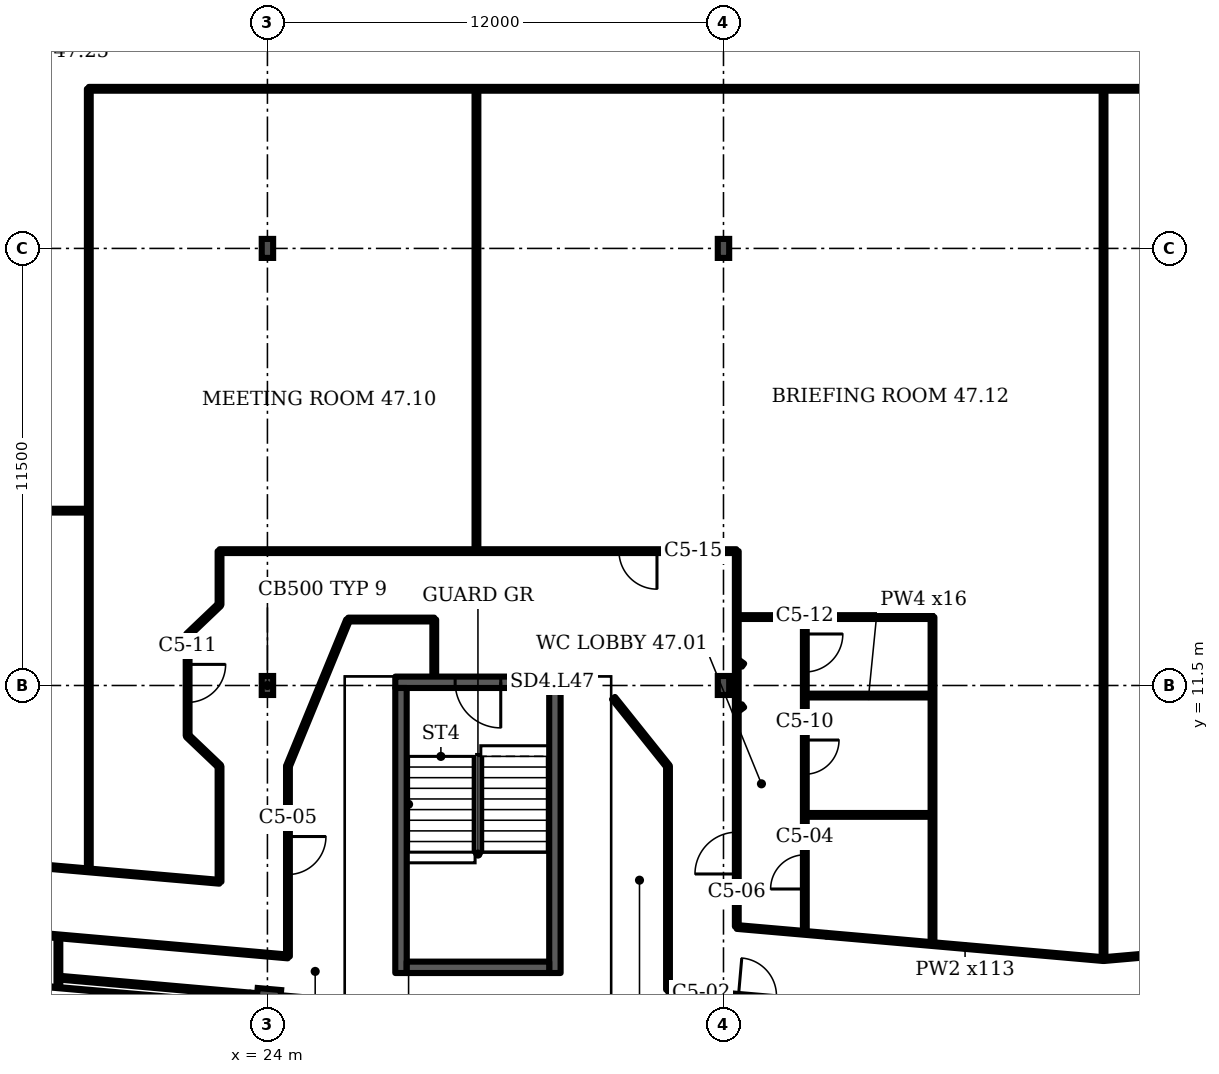
"""IFC4 building model, lengths in metres.
Left out: names, types, materials, properties, quantities, classifications, styles, units other than length and angle.
Written with IfcOpenShell. Run it as: python <this file> out.ifc"""

import sys

from ifc_helpers import new_model, si_unit, direction, frame, frame_2d, origin, origin_2d, place, context, subcontext, project, spatial, rectangle, i_section, extrude, element, fill, save


model = new_model("IFC4")
c1 = context("Model", 3, precision=1e-05, world=origin(), true_north=direction((0.0, 1.0)))
c2 = subcontext(c1, "Body", "Model", "MODEL_VIEW")
j1 = project(units=[si_unit("LENGTHUNIT", "METRE"), si_unit("PLANEANGLEUNIT", "RADIAN")], contexts=[c1])
p1 = place(None, origin())
s1 = spatial("IfcSite", under=j1, at=p1, CompositionType="ELEMENT")
p2 = place(p1, origin())
s2 = spatial("IfcBuilding", under=s1, at=p2, CompositionType="ELEMENT")
p3 = place(p2, frame((0.0, 0.0, 191.5)))
s3 = spatial("IfcBuildingStorey", under=s2, at=p3, CompositionType="ELEMENT", Elevation=191.5)
p4 = place(p3, frame((24.039, 3.361, 0.0), z_axis=(0.0, 0.0, 1.0), x_axis=(-0.087156, -0.996198, 0.0)))
e1 = element("IfcColumn", 1, at=p4, inside=s3, PredefinedType="COLUMN", context=c2, shape_type="SweptSolid", body=[
    extrude(i_section(OverallWidth=0.305, OverallDepth=0.62, WebThickness=0.021, FlangeThickness=0.04, FilletRadius=0.027, at=origin_2d()), origin(), (0.0, 0.0, 1.0), 3.6),
])
for number, where, z_axis, x_axis in (
    (2, (24.0, 11.5, 0.0), (0.0, 0.0, 1.0), (1.0, 0.0, 0.0)),
    (3, (36.0, 11.5, 0.0), (0.0, 0.0, 1.0), (1.0, 0.0, 0.0)),
    (4, (24.0, 23.0, 0.0), (0.0, 0.0, 1.0), (1.0, 0.0, 0.0)),
    (5, (36.0, 23.0, 0.0), (0.0, 0.0, 1.0), (1.0, 0.0, 0.0)),
):
    element("IfcColumn", number, at=place(p3, frame(where, z_axis=z_axis, x_axis=x_axis)), inside=s3, PredefinedType="COLUMN", context=c2, shape_type="SweptSolid", body=[
        extrude(i_section(OverallWidth=0.3, OverallDepth=0.5, WebThickness=0.014, FlangeThickness=0.028, FilletRadius=0.027, at=origin_2d()), origin(), (0.0, 0.0, 1.0), 3.6),
    ])
p5 = place(p3, frame((12.835, 3.885, 0.0), z_axis=(0.0, 0.0, 1.0), x_axis=(0.996199, -0.087154, 0.0)))
e6 = element("IfcWall", 6, at=p5, inside=s3, PredefinedType="SOLIDWALL", context=c2, shape_type="SweptSolid", body=[
    extrude(rectangle(XDim=11.177, YDim=0.35, at=frame_2d((5.588, 0.0))), origin(), (0.0, 0.0, 1.0), 1.0),
])
p6 = place(p3, frame((27.364, 11.584, 0.0), z_axis=(0.0, 0.0, 1.0), x_axis=(1.0, 0.0, 0.0)))
e7 = element("IfcWall", 7, at=p6, inside=s3, PredefinedType="SHEAR", context=c2, shape_type="SweptSolid", body=[
    extrude(rectangle(XDim=4.35, YDim=0.3, at=frame_2d((2.175, 0.0))), origin(), (0.0, 0.0, 1.0), 3.2),
])
p7 = place(p6, frame((1.575, 0.0, 0.0)))
e8 = element("IfcOpeningElement", 8, at=p7, cuts=e7, PredefinedType="OPENING", context=c2, shape_type="SweptSolid", body=[
    extrude(rectangle(XDim=1.2, YDim=2.1, at=frame_2d((0.6, 1.05))), frame((0.0, 0.16, 0.0), z_axis=(0.0, -1.0, 0.0), x_axis=(1.0, 0.0, 0.0)), (0.0, 0.0, 1.0), 0.32),
])
p8 = place(p3, frame((10.3, 16.1, 0.0), z_axis=(0.0, 0.0, 1.0), x_axis=(1.0, 0.0, 0.0)))
e9 = element("IfcWall", 9, at=p8, inside=s3, PredefinedType="PARTITIONING", context=c2, shape_type="SweptSolid", body=[
    extrude(rectangle(XDim=9.0, YDim=0.1, at=frame_2d((4.5, 0.0))), origin(), (0.0, 0.0, 1.0), 3.2),
])
p9 = place(p3, frame((18.5, 3.425, 0.0), z_axis=(0.0, 0.0, 1.0), x_axis=(0.0, 1.0, 0.0)))
e10 = element("IfcWall", 10, at=p9, inside=s3, PredefinedType="PARTITIONING", context=c2, shape_type="SweptSolid", body=[
    extrude(rectangle(XDim=1.475, YDim=0.1, at=frame_2d((0.737, 0.0))), origin(), (0.0, 0.0, 1.0), 2.58),
])
p10 = place(p3, frame((19.3, 6.705, 0.0), z_axis=(0.0, 0.0, 1.0), x_axis=(0.0, 1.0, 0.0)))
e11 = element("IfcWall", 11, at=p10, inside=s3, PredefinedType="PARTITIONING", context=c2, shape_type="SweptSolid", body=[
    extrude(rectangle(XDim=20.495, YDim=0.1, at=frame_2d((10.248, 0.0))), origin(), (0.0, 0.0, 1.0), 3.2),
])
p11 = place(p3, frame((19.3, 27.2, 0.0), z_axis=(0.0, 0.0, 1.0), x_axis=(1.0, 0.0, 0.0)))
e12 = element("IfcWall", 12, at=p11, inside=s3, PredefinedType="PARTITIONING", context=c2, shape_type="SweptSolid", body=[
    extrude(rectangle(XDim=41.305, YDim=0.1, at=frame_2d((20.652, 0.0))), origin(), (0.0, 0.0, 1.0), 3.2),
])
p12 = place(p11, frame((32.32, 0.0, 0.0)))
e13 = element("IfcOpeningElement", 13, at=p12, cuts=e12, PredefinedType="OPENING", context=c2, shape_type="SweptSolid", body=[
    extrude(rectangle(XDim=1.8, YDim=2.1, at=frame_2d((0.9, 1.05))), frame((0.0, 0.06, 0.0), z_axis=(0.0, -1.0, 0.0), x_axis=(1.0, 0.0, 0.0)), (0.0, 0.0, 1.0), 0.12),
])
p13 = place(p3, frame((21.9, 12.825, 0.0), z_axis=(0.0, 0.0, 1.0), x_axis=(0.724157, 0.689643, 0.0)))
e14 = element("IfcWall", 14, at=p13, inside=s3, PredefinedType="PARTITIONING", context=c2, shape_type="SweptSolid", body=[
    extrude(rectangle(XDim=1.16, YDim=0.1, at=frame_2d((0.58, 0.0))), origin(), (0.0, 0.0, 1.0), 3.2),
])
p14 = place(p3, frame((21.9, 10.175, 0.0), z_axis=(0.0, 0.0, 1.0), x_axis=(0.0, 1.0, 0.0)))
e15 = element("IfcWall", 15, at=p14, inside=s3, PredefinedType="PARTITIONING", context=c2, shape_type="SweptSolid", body=[
    extrude(rectangle(XDim=2.65, YDim=0.1, at=frame_2d((1.325, 0.0))), origin(), (0.0, 0.0, 1.0), 3.2),
])
p15 = place(p14, frame((0.88, 0.0, 0.0)))
e16 = element("IfcOpeningElement", 16, at=p15, cuts=e15, PredefinedType="OPENING", context=c2, shape_type="SweptSolid", body=[
    extrude(rectangle(XDim=1.0, YDim=2.1, at=frame_2d((0.5, 1.05))), frame((0.0, 0.06, 0.0), z_axis=(0.0, -1.0, 0.0), x_axis=(1.0, 0.0, 0.0)), (0.0, 0.0, 1.0), 0.12),
])
p16 = place(p3, frame((22.74, 9.375, 0.0), z_axis=(0.0, 0.0, 1.0), x_axis=(-0.724157, 0.689643, 0.0)))
e17 = element("IfcWall", 17, at=p16, inside=s3, PredefinedType="PARTITIONING", context=c2, shape_type="SweptSolid", body=[
    extrude(rectangle(XDim=1.16, YDim=0.1, at=frame_2d((0.58, 0.0))), origin(), (0.0, 0.0, 1.0), 3.2),
])
p17 = place(p3, frame((22.74, 6.335, 0.0), z_axis=(0.0, 0.0, 1.0), x_axis=(-0.996229, 0.086722, 0.0)))
e18 = element("IfcWall", 18, at=p17, inside=s3, PredefinedType="PARTITIONING", context=c2, shape_type="SweptSolid", body=[
    extrude(rectangle(XDim=6.478, YDim=0.1, at=frame_2d((3.239, 0.0))), origin(), (0.0, 0.0, 1.0), 3.2),
])
p18 = place(p3, frame((22.74, 6.335, 0.0), z_axis=(0.0, 0.0, 1.0), x_axis=(0.0, 1.0, 0.0)))
e19 = element("IfcWall", 19, at=p18, inside=s3, PredefinedType="PARTITIONING", context=c2, shape_type="SweptSolid", body=[
    extrude(rectangle(XDim=3.04, YDim=0.1, at=frame_2d((1.52, 0.0))), origin(), (0.0, 0.0, 1.0), 3.2),
])
p19 = place(p3, frame((22.74, 13.625, 0.0), z_axis=(0.0, 0.0, 1.0), x_axis=(0.0, 1.0, 0.0)))
e20 = element("IfcWall", 20, at=p19, inside=s3, PredefinedType="PARTITIONING", context=c2, shape_type="SweptSolid", body=[
    extrude(rectangle(XDim=1.41, YDim=0.1, at=frame_2d((0.705, 0.0))), origin(), (0.0, 0.0, 1.0), 3.2),
])
p20 = place(p3, frame((22.74, 15.035, 0.0), z_axis=(0.0, 0.0, 1.0), x_axis=(1.0, 0.0, 0.0)))
e21 = element("IfcWall", 21, at=p20, inside=s3, PredefinedType="PARTITIONING", context=c2, shape_type="SweptSolid", body=[
    extrude(rectangle(XDim=13.6, YDim=0.1, at=frame_2d((6.8, 0.0))), origin(), (0.0, 0.0, 1.0), 3.2),
])
p21 = place(p20, frame((10.51, 0.0, 0.0)))
e22 = element("IfcOpeningElement", 22, at=p21, cuts=e21, PredefinedType="OPENING", context=c2, shape_type="SweptSolid", body=[
    extrude(rectangle(XDim=1.0, YDim=2.1, at=frame_2d((0.5, 1.05))), frame((0.0, 0.06, 0.0), z_axis=(0.0, -1.0, 0.0), x_axis=(1.0, 0.0, 0.0)), (0.0, 0.0, 1.0), 0.12),
])
p22 = place(p3, frame((23.54, 3.37, 0.0), z_axis=(0.0, 0.0, 1.0), x_axis=(-0.996148, 0.087735, 0.0)))
e23 = element("IfcWall", 23, at=p22, inside=s3, PredefinedType="PARTITIONING", context=c2, shape_type="SweptSolid", body=[
    extrude(rectangle(XDim=5.014, YDim=0.1, at=frame_2d((2.507, 0.0))), origin(), (0.0, 0.0, 1.0), 2.58),
])
p23 = place(p3, frame((24.54, 9.375, 0.0), z_axis=(0.0, 0.0, 1.0), x_axis=(0.380187, 0.924914, 0.0)))
e24 = element("IfcWall", 24, at=p23, inside=s3, PredefinedType="PARTITIONING", context=c2, shape_type="SweptSolid", body=[
    extrude(rectangle(XDim=4.156, YDim=0.1, at=frame_2d((2.078, 0.0))), origin(), (0.0, 0.0, 1.0), 3.2),
])
p24 = place(p3, frame((24.54, 4.37, 0.0), z_axis=(0.0, 0.0, 1.0), x_axis=(0.0, 1.0, 0.0)))
e25 = element("IfcWall", 25, at=p24, inside=s3, PredefinedType="PARTITIONING", context=c2, shape_type="SweptSolid", body=[
    extrude(rectangle(XDim=5.005, YDim=0.1, at=frame_2d((2.502, 0.0))), origin(), (0.0, 0.0, 1.0), 3.2),
])
p25 = place(p24, frame((2.156, 0.0, 0.0)))
e26 = element("IfcOpeningElement", 26, at=p25, cuts=e25, PredefinedType="OPENING", context=c2, shape_type="SweptSolid", body=[
    extrude(rectangle(XDim=1.0, YDim=2.1, at=frame_2d((0.5, 1.05))), frame((0.0, 0.06, 0.0), z_axis=(0.0, -1.0, 0.0), x_axis=(1.0, 0.0, 0.0)), (0.0, 0.0, 1.0), 0.12),
])
p26 = place(p3, frame((24.54, 4.37, 0.0), z_axis=(0.0, 0.0, 1.0), x_axis=(-0.996178, 0.08739, 0.0)))
e27 = element("IfcWall", 27, at=p26, inside=s3, PredefinedType="PARTITIONING", context=c2, shape_type="SweptSolid", body=[
    extrude(rectangle(XDim=10.077, YDim=0.1, at=frame_2d((5.039, 0.0))), origin(), (0.0, 0.0, 1.0), 3.2),
])
p27 = place(p3, frame((26.019, 3.157, 0.0), z_axis=(0.0, 0.0, 1.0), x_axis=(-0.996317, 0.085749, 0.0)))
e28 = element("IfcWall", 28, at=p27, inside=s3, PredefinedType="PARTITIONING", context=c2, shape_type="SweptSolid", body=[
    extrude(rectangle(XDim=2.489, YDim=0.1, at=frame_2d((1.244, 0.0))), origin(), (0.0, 0.0, 1.0), 2.58),
])
p28 = place(p3, frame((26.125, 13.235, 0.0), z_axis=(0.0, 0.0, 1.0), x_axis=(1.0, 0.0, 0.0)))
e29 = element("IfcWall", 29, at=p28, inside=s3, PredefinedType="PARTITIONING", context=c2, shape_type="SweptSolid", body=[
    extrude(rectangle(XDim=2.265, YDim=0.1, at=frame_2d((1.132, 0.0))), origin(), (0.0, 0.0, 1.0), 3.2),
])
p29 = place(p3, frame((28.39, 11.754, 0.0), z_axis=(0.0, 0.0, 1.0), x_axis=(0.0, 1.0, 0.0)))
e30 = element("IfcWall", 30, at=p29, inside=s3, PredefinedType="PARTITIONING", context=c2, shape_type="SweptSolid", body=[
    extrude(rectangle(XDim=1.481, YDim=0.1, at=frame_2d((0.74, 0.0))), origin(), (0.0, 0.0, 1.0), 3.2),
])
p30 = place(p3, frame((29.5, 15.035, 0.0), z_axis=(0.0, 0.0, 1.0), x_axis=(0.0, 1.0, 0.0)))
e31 = element("IfcWall", 31, at=p30, inside=s3, PredefinedType="PARTITIONING", context=c2, shape_type="SweptSolid", body=[
    extrude(rectangle(XDim=12.165, YDim=0.1, at=frame_2d((6.083, 0.0))), origin(), (0.0, 0.0, 1.0), 3.2),
])
p31 = place(p3, frame((34.54, 3.495, 0.0), z_axis=(0.0, 0.0, 1.0), x_axis=(0.0, 1.0, 0.0)))
e32 = element("IfcWall", 32, at=p31, inside=s3, PredefinedType="PARTITIONING", context=c2, shape_type="SweptSolid", body=[
    extrude(rectangle(XDim=5.88, YDim=0.1, at=frame_2d((2.94, 0.0))), origin(), (0.0, 0.0, 1.0), 3.2),
])
p32 = place(p3, frame((34.54, 9.375, 0.0), z_axis=(0.0, 0.0, 1.0), x_axis=(-0.624735, 0.780839, 0.0)))
e33 = element("IfcWall", 33, at=p32, inside=s3, PredefinedType="PARTITIONING", context=c2, shape_type="SweptSolid", body=[
    extrude(rectangle(XDim=2.296, YDim=0.1, at=frame_2d((1.148, 0.0))), origin(), (0.0, 0.0, 1.0), 3.2),
])
p33 = place(p3, frame((36.35, 5.155, 0.0), z_axis=(0.0, 0.0, 1.0), x_axis=(0.0, 1.0, 0.0)))
e34 = element("IfcWall", 34, at=p33, inside=s3, PredefinedType="PARTITIONING", context=c2, shape_type="SweptSolid", body=[
    extrude(rectangle(XDim=9.88, YDim=0.1, at=frame_2d((4.94, 0.0))), origin(), (0.0, 0.0, 1.0), 3.2),
])
p34 = place(p33, frame((1.385, 0.0, 0.0)))
e35 = element("IfcOpeningElement", 35, at=p34, cuts=e34, PredefinedType="OPENING", context=c2, shape_type="SweptSolid", body=[
    extrude(rectangle(XDim=1.1, YDim=2.1, at=frame_2d((0.55, 1.05))), frame((0.0, 0.06, 0.0), z_axis=(0.0, -1.0, 0.0), x_axis=(1.0, 0.0, 0.0)), (0.0, 0.0, 1.0), 0.12),
])
p35 = place(p3, frame((36.35, 10.845, 0.0), z_axis=(0.0, 0.0, 1.0), x_axis=(0.808115, 0.589026, 0.0)))
e36 = element("IfcWall", 36, at=p35, inside=s3, PredefinedType="PARTITIONING", context=c2, shape_type="SweptSolid", body=[
    extrude(rectangle(XDim=0.204, YDim=0.1, at=frame_2d((0.102, 0.0))), origin(), (0.0, 0.0, 1.0), 3.2),
])
p36 = place(p3, frame((36.35, 13.3, 0.0), z_axis=(0.0, 0.0, 1.0), x_axis=(1.0, 0.0, 0.0)))
e37 = element("IfcWall", 37, at=p36, inside=s3, PredefinedType="PARTITIONING", context=c2, shape_type="SweptSolid", body=[
    extrude(rectangle(XDim=5.15, YDim=0.1, at=frame_2d((2.575, 0.0))), origin(), (0.0, 0.0, 1.0), 3.2),
])
p37 = place(p3, frame((36.515, 12.035, 0.0), z_axis=(0.0, 0.0, 1.0), x_axis=(-0.808115, 0.589026, 0.0)))
e38 = element("IfcWall", 38, at=p37, inside=s3, PredefinedType="PARTITIONING", context=c2, shape_type="SweptSolid", body=[
    extrude(rectangle(XDim=0.204, YDim=0.1, at=frame_2d((0.102, 0.0))), origin(), (0.0, 0.0, 1.0), 3.2),
])
p38 = place(p3, frame((38.14, 5.0, 0.0), z_axis=(0.0, 0.0, 1.0), x_axis=(0.0, 1.0, 0.0)))
e39 = element("IfcWall", 39, at=p38, inside=s3, PredefinedType="PARTITIONING", context=c2, shape_type="SweptSolid", body=[
    extrude(rectangle(XDim=8.3, YDim=0.1, at=frame_2d((4.15, 0.0))), origin(), (0.0, 0.0, 1.0), 3.2),
])
p39 = place(p38, frame((1.145, 0.0, 0.0)))
e40 = element("IfcOpeningElement", 40, at=p39, cuts=e39, PredefinedType="OPENING", context=c2, shape_type="SweptSolid", body=[
    extrude(rectangle(XDim=0.9, YDim=2.1, at=frame_2d((0.45, 1.05))), frame((0.0, 0.06, 0.0), z_axis=(0.0, -1.0, 0.0), x_axis=(1.0, 0.0, 0.0)), (0.0, 0.0, 1.0), 0.12),
])
p40 = place(p38, frame((4.165, 0.0, 0.0)))
e41 = element("IfcOpeningElement", 41, at=p40, cuts=e39, PredefinedType="OPENING", context=c2, shape_type="SweptSolid", body=[
    extrude(rectangle(XDim=0.9, YDim=2.1, at=frame_2d((0.45, 1.05))), frame((0.0, 0.06, 0.0), z_axis=(0.0, -1.0, 0.0), x_axis=(1.0, 0.0, 0.0)), (0.0, 0.0, 1.0), 0.12),
])
p41 = place(p38, frame((6.855, 0.0, 0.0)))
e42 = element("IfcOpeningElement", 42, at=p41, cuts=e39, PredefinedType="OPENING", context=c2, shape_type="SweptSolid", body=[
    extrude(rectangle(XDim=1.0, YDim=2.1, at=frame_2d((0.5, 1.05))), frame((0.0, 0.06, 0.0), z_axis=(0.0, -1.0, 0.0), x_axis=(1.0, 0.0, 0.0)), (0.0, 0.0, 1.0), 0.12),
])
for number, where, z_axis, x_axis in (
    (43, (38.14, 8.095, 0.0), (0.0, 0.0, 1.0), (1.0, 0.0, 0.0)),
    (44, (38.14, 11.235, 0.0), (0.0, 0.0, 1.0), (1.0, 0.0, 0.0)),
):
    element("IfcWall", number, at=place(p3, frame(where, z_axis=z_axis, x_axis=x_axis)), inside=s3, PredefinedType="PARTITIONING", context=c2, shape_type="SweptSolid", body=[
        extrude(rectangle(XDim=3.36, YDim=0.1, at=frame_2d((1.68, 0.0))), origin(), (0.0, 0.0, 1.0), 3.2),
    ])
p42 = place(p3, frame((38.715, 4.94, 0.0), z_axis=(0.0, 0.0, 1.0), x_axis=(-0.996236, 0.086674, 0.0)))
e45 = element("IfcWall", 45, at=p42, inside=s3, PredefinedType="PARTITIONING", context=c2, shape_type="SweptSolid", body=[
    extrude(rectangle(XDim=2.372, YDim=0.1, at=frame_2d((1.186, 0.0))), origin(), (0.0, 0.0, 1.0), 3.2),
])
p43 = place(p3, frame((41.5, 4.695, 0.0), z_axis=(0.0, 0.0, 1.0), x_axis=(0.0, 1.0, 0.0)))
e46 = element("IfcWall", 46, at=p43, inside=s3, PredefinedType="PARTITIONING", context=c2, shape_type="SweptSolid", body=[
    extrude(rectangle(XDim=8.605, YDim=0.1, at=frame_2d((4.302, 0.0))), origin(), (0.0, 0.0, 1.0), 3.2),
])
p44 = place(p3, frame((46.0, 4.3, 0.0), z_axis=(0.0, 0.0, 1.0), x_axis=(-0.996173, 0.087448, 0.0)))
e47 = element("IfcWall", 47, at=p44, inside=s3, PredefinedType="PARTITIONING", context=c2, shape_type="SweptSolid", body=[
    extrude(rectangle(XDim=7.315, YDim=0.1, at=frame_2d((3.657, 0.0))), origin(), (0.0, 0.0, 1.0), 3.2),
])
p45 = place(p3, frame((46.0, 2.495, 0.0), z_axis=(0.0, 0.0, 1.0), x_axis=(-0.996214, 0.08693, 0.0)))
e48 = element("IfcWall", 48, at=p45, inside=s3, PredefinedType="PARTITIONING", context=c2, shape_type="SweptSolid", body=[
    extrude(rectangle(XDim=11.503, YDim=0.1, at=frame_2d((5.752, 0.0))), origin(), (0.0, 0.0, 1.0), 3.2),
])
p46 = place(p45, frame((8.642, 0.0, 0.0)))
e49 = element("IfcOpeningElement", 49, at=p46, cuts=e48, PredefinedType="OPENING", context=c2, shape_type="SweptSolid", body=[
    extrude(rectangle(XDim=1.0, YDim=2.1, at=frame_2d((0.5, 1.05))), frame((0.0, 0.06, 0.0), z_axis=(0.0, -1.0, 0.0), x_axis=(1.0, 0.0, 0.0)), (0.0, 0.0, 1.0), 0.12),
])
p47 = place(p3, frame((46.0, 4.3, 0.0), z_axis=(0.0, 0.0, 1.0), x_axis=(0.0, 1.0, 0.0)))
e50 = element("IfcWall", 50, at=p47, inside=s3, PredefinedType="PARTITIONING", context=c2, shape_type="SweptSolid", body=[
    extrude(rectangle(XDim=22.9, YDim=0.1, at=frame_2d((11.45, 0.0))), origin(), (0.0, 0.0, 1.0), 3.2),
])
p48 = place(p3, frame((46.0, 4.3, 0.0), z_axis=(0.0, 0.0, 1.0), x_axis=(0.996189, 0.087194, 0.0)))
e51 = element("IfcWall", 51, at=p48, inside=s3, PredefinedType="PARTITIONING", context=c2, shape_type="SweptSolid", body=[
    extrude(rectangle(XDim=12.558, YDim=0.1, at=frame_2d((6.279, 0.0))), origin(), (0.0, 0.0, 1.0), 3.2),
])
for number, where, z_axis, x_axis in (
    (52, (27.514, 3.934, 0.0), (0.0, 0.0, 1.0), (0.0, 1.0, 0.0)),
    (53, (31.564, 3.934, 0.0), (0.0, 0.0, 1.0), (0.0, 1.0, 0.0)),
):
    element("IfcWall", number, at=place(p3, frame(where, z_axis=z_axis, x_axis=x_axis)), inside=s3, PredefinedType="SHEAR", context=c2, shape_type="SweptSolid", body=[
        extrude(rectangle(XDim=7.5, YDim=0.3, at=frame_2d((3.75, 0.0))), origin(), (0.0, 0.0, 1.0), 3.2),
    ])
p49 = place(p3, frame((27.664, 4.084, 0.0), z_axis=(0.0, 0.0, 1.0), x_axis=(1.0, 0.0, 0.0)))
e54 = element("IfcWall", 54, at=p49, inside=s3, PredefinedType="SHEAR", context=c2, shape_type="SweptSolid", body=[
    extrude(rectangle(XDim=3.75, YDim=0.3, at=frame_2d((1.875, 0.0))), origin(), (0.0, 0.0, 1.0), 3.2),
])
p50 = place(p7, origin())
e55 = element("IfcDoor", 55, at=p50, inside=s3, OperationType="SINGLE_SWING_RIGHT", PredefinedType="DOOR", context=c2, shape_type="SweptSolid", body=[
    extrude(rectangle(XDim=1.2, YDim=2.1, at=frame_2d((0.6, 1.05))), frame((0.0, 0.025, 0.0), z_axis=(0.0, -1.0, 0.0), x_axis=(1.0, 0.0, 0.0)), (0.0, 0.0, 1.0), 0.05),
])
fill(e8, e55)
p51 = place(p46, origin())
e56 = element("IfcDoor", 56, at=p51, inside=s3, OperationType="SINGLE_SWING_RIGHT", PredefinedType="DOOR", context=c2, shape_type="SweptSolid", body=[
    extrude(rectangle(XDim=1.0, YDim=2.1, at=frame_2d((0.5, 1.05))), frame((0.0, 0.025, 0.0), z_axis=(0.0, -1.0, 0.0), x_axis=(1.0, 0.0, 0.0)), (0.0, 0.0, 1.0), 0.05),
])
fill(e49, e56)
p52 = place(p39, origin())
e57 = element("IfcDoor", 57, at=p52, inside=s3, OperationType="SINGLE_SWING_LEFT", PredefinedType="DOOR", context=c2, shape_type="SweptSolid", body=[
    extrude(rectangle(XDim=0.9, YDim=2.1, at=frame_2d((0.45, 1.05))), frame((0.0, 0.025, 0.0), z_axis=(0.0, -1.0, 0.0), x_axis=(1.0, 0.0, 0.0)), (0.0, 0.0, 1.0), 0.05),
])
fill(e40, e57)
p53 = place(p25, origin())
e58 = element("IfcDoor", 58, at=p53, inside=s3, OperationType="SINGLE_SWING_RIGHT", PredefinedType="DOOR", context=c2, shape_type="SweptSolid", body=[
    extrude(rectangle(XDim=1.0, YDim=2.1, at=frame_2d((0.5, 1.05))), frame((0.0, 0.025, 0.0), z_axis=(0.0, -1.0, 0.0), x_axis=(1.0, 0.0, 0.0)), (0.0, 0.0, 1.0), 0.05),
])
fill(e26, e58)
p54 = place(p34, origin())
e59 = element("IfcDoor", 59, at=p54, inside=s3, OperationType="SINGLE_SWING_LEFT", PredefinedType="DOOR", context=c2, shape_type="SweptSolid", body=[
    extrude(rectangle(XDim=1.1, YDim=2.1, at=frame_2d((0.55, 1.05))), frame((0.0, 0.025, 0.0), z_axis=(0.0, -1.0, 0.0), x_axis=(1.0, 0.0, 0.0)), (0.0, 0.0, 1.0), 0.05),
])
fill(e35, e59)
p55 = place(p40, origin())
e60 = element("IfcDoor", 60, at=p55, inside=s3, OperationType="SINGLE_SWING_RIGHT", PredefinedType="DOOR", context=c2, shape_type="SweptSolid", body=[
    extrude(rectangle(XDim=0.9, YDim=2.1, at=frame_2d((0.45, 1.05))), frame((0.0, 0.025, 0.0), z_axis=(0.0, -1.0, 0.0), x_axis=(1.0, 0.0, 0.0)), (0.0, 0.0, 1.0), 0.05),
])
fill(e41, e60)
p56 = place(p15, origin())
e61 = element("IfcDoor", 61, at=p56, inside=s3, OperationType="SINGLE_SWING_RIGHT", PredefinedType="DOOR", context=c2, shape_type="SweptSolid", body=[
    extrude(rectangle(XDim=1.0, YDim=2.1, at=frame_2d((0.5, 1.05))), frame((0.0, 0.025, 0.0), z_axis=(0.0, -1.0, 0.0), x_axis=(1.0, 0.0, 0.0)), (0.0, 0.0, 1.0), 0.05),
])
fill(e16, e61)
p57 = place(p41, origin())
e62 = element("IfcDoor", 62, at=p57, inside=s3, OperationType="SINGLE_SWING_RIGHT", PredefinedType="DOOR", context=c2, shape_type="SweptSolid", body=[
    extrude(rectangle(XDim=1.0, YDim=2.1, at=frame_2d((0.5, 1.05))), frame((0.0, 0.025, 0.0), z_axis=(0.0, -1.0, 0.0), x_axis=(1.0, 0.0, 0.0)), (0.0, 0.0, 1.0), 0.05),
])
fill(e42, e62)
p58 = place(p21, origin())
e63 = element("IfcDoor", 63, at=p58, inside=s3, OperationType="SINGLE_SWING_RIGHT", PredefinedType="DOOR", context=c2, shape_type="SweptSolid", body=[
    extrude(rectangle(XDim=1.0, YDim=2.1, at=frame_2d((0.5, 1.05))), frame((0.0, 0.025, 0.0), z_axis=(0.0, -1.0, 0.0), x_axis=(1.0, 0.0, 0.0)), (0.0, 0.0, 1.0), 0.05),
])
fill(e22, e63)
save(model, sys.argv[1])
